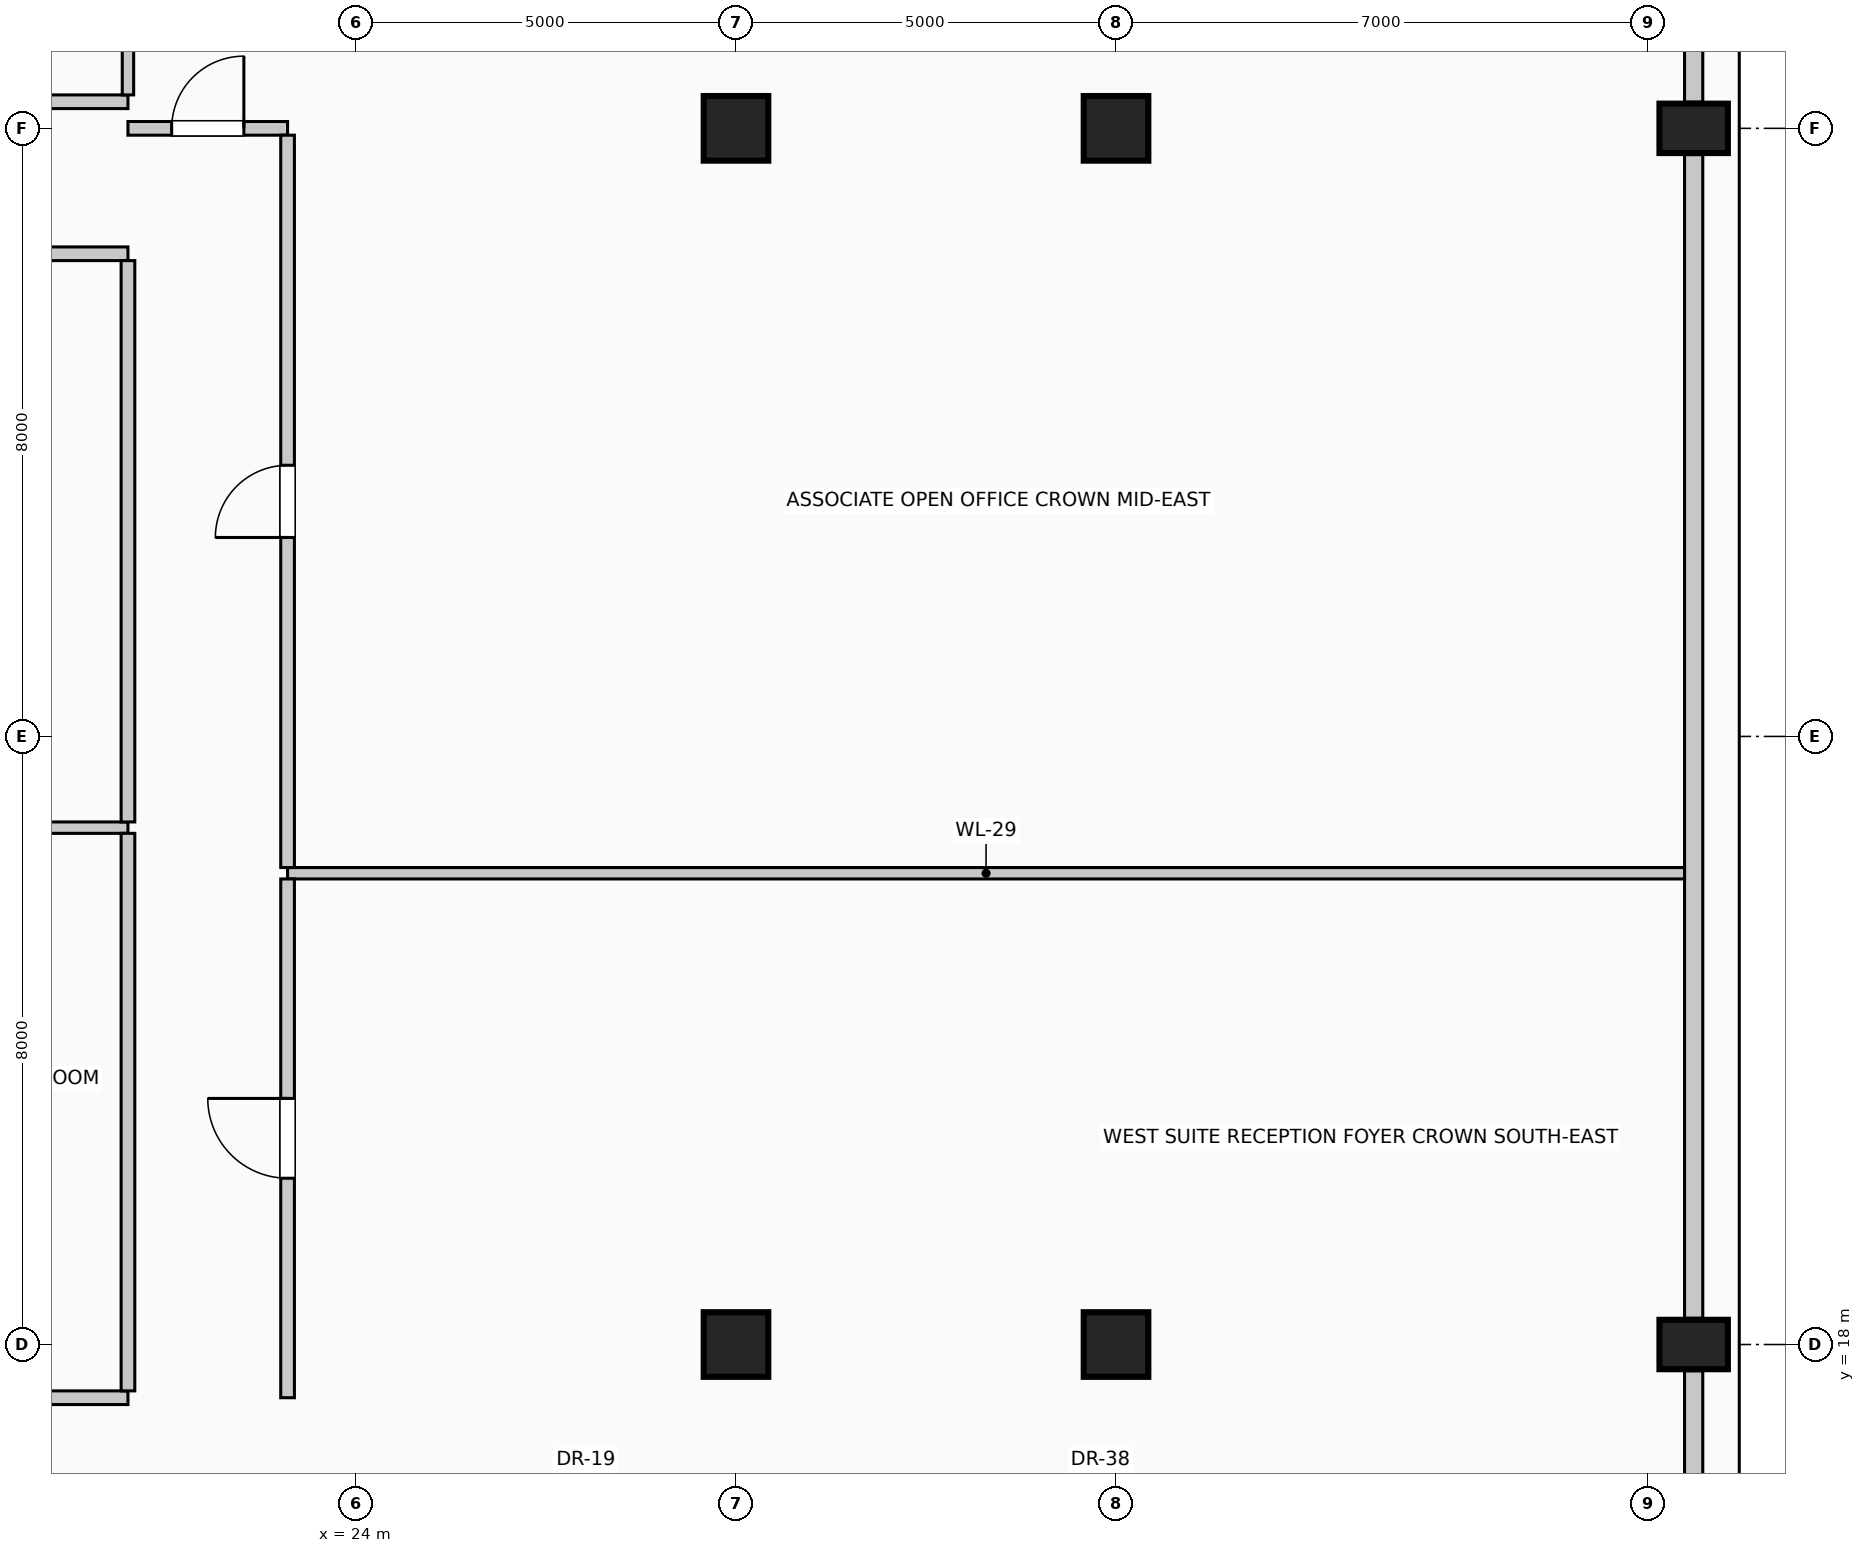
"""IFC4 building model, lengths in metres.
Left out: names, types, materials, properties, quantities, classifications, styles, units other than length and angle.
Written with IfcOpenShell. Run it as: python <this file> out.ifc"""

import sys

from ifc_helpers import new_model, si_unit, direction, frame, frame_2d, origin, origin_2d, place, context, subcontext, project, spatial, rectangle, circle, extrude, element, fill, save


model = new_model("IFC4")
c1 = context("Model", 3, precision=1e-05, world=origin(), true_north=direction((0.0, 1.0)))
c2 = subcontext(c1, "Body", "Model", "MODEL_VIEW")
j1 = project(units=[si_unit("LENGTHUNIT", "METRE"), si_unit("PLANEANGLEUNIT", "RADIAN")], contexts=[c1])
p1 = place(None, origin())
s1 = spatial("IfcSite", under=j1, at=p1, CompositionType="ELEMENT")
p2 = place(p1, origin())
s2 = spatial("IfcBuilding", under=s1, at=p2, CompositionType="ELEMENT")
p3 = place(p2, frame((0.0, 0.0, 301.0)))
s3 = spatial("IfcBuildingStorey", under=s2, at=p3, CompositionType="ELEMENT", Elevation=301.0)
for number, where, z_axis, x_axis in (
    (1, (41.6, 18.0, 0.0), (0.0, 0.0, 1.0), (0.0, 1.0, 0.0)),
    (2, (41.6, 34.0, 0.0), (0.0, 0.0, 1.0), (0.0, 1.0, 0.0)),
):
    element("IfcColumn", number, at=place(p3, frame(where, z_axis=z_axis, x_axis=x_axis)), inside=s3, PredefinedType="COLUMN", context=c2, shape_type="SweptSolid", body=[
        extrude(rectangle(XDim=0.65, YDim=0.9, at=origin_2d()), origin(), (0.0, 0.0, 1.0), 4.0),
    ])
for number, where, z_axis, x_axis in (
    (3, (29.0, 18.0, 0.0), (0.0, 0.0, 1.0), (1.0, 0.0, 0.0)),
    (4, (29.0, 34.0, 0.0), (0.0, 0.0, 1.0), (1.0, 0.0, 0.0)),
    (5, (34.0, 18.0, 0.0), (0.0, 0.0, 1.0), (1.0, 0.0, 0.0)),
    (6, (34.0, 34.0, 0.0), (0.0, 0.0, 1.0), (1.0, 0.0, 0.0)),
):
    element("IfcColumn", number, at=place(p3, frame(where, z_axis=z_axis, x_axis=x_axis)), inside=s3, PredefinedType="COLUMN", context=c2, shape_type="SweptSolid", body=[
        extrude(circle(Radius=0.425, at=origin_2d()), origin(), (0.0, 0.0, 1.0), 4.0),
    ])
p4 = place(p3, frame((41.6, 17.655, 0.0), z_axis=(0.0, 0.0, 1.0), x_axis=(0.0, -1.0, 0.0)))
e7 = element("IfcWall", 7, at=p4, inside=s3, PredefinedType="SOLIDWALL", context=c2, shape_type="SweptSolid", body=[
    extrude(rectangle(XDim=13.71, YDim=0.24, at=frame_2d((6.855, 0.0))), origin(), (0.0, 0.0, 1.0), 3.015),
])
p5 = place(p4, frame((3.17, 0.0, 0.35)))
e8 = element("IfcOpeningElement", 8, at=p5, cuts=e7, PredefinedType="OPENING", context=c2, shape_type="SweptSolid", body=[
    extrude(rectangle(XDim=2.1, YDim=2.2, at=frame_2d((1.05, 1.1))), frame((0.0, 0.13, 0.0), z_axis=(0.0, -1.0, 0.0), x_axis=(1.0, 0.0, 0.0)), (0.0, 0.0, 1.0), 0.26),
])
p6 = place(p4, frame((8.44, 0.0, 0.35)))
e9 = element("IfcOpeningElement", 9, at=p6, cuts=e7, PredefinedType="OPENING", context=c2, shape_type="SweptSolid", body=[
    extrude(rectangle(XDim=2.1, YDim=2.2, at=frame_2d((1.05, 1.1))), frame((0.0, 0.13, 0.0), z_axis=(0.0, -1.0, 0.0), x_axis=(1.0, 0.0, 0.0)), (0.0, 0.0, 1.0), 0.26),
])
p7 = place(p3, frame((41.6, 33.655, 0.0), z_axis=(0.0, 0.0, 1.0), x_axis=(0.0, -1.0, 0.0)))
e10 = element("IfcWall", 10, at=p7, inside=s3, PredefinedType="SOLIDWALL", context=c2, shape_type="SweptSolid", body=[
    extrude(rectangle(XDim=15.31, YDim=0.24, at=frame_2d((7.655, 0.0))), origin(), (0.0, 0.0, 1.0), 3.015),
])
p8 = place(p3, frame((41.6, 42.055, 0.0), z_axis=(0.0, 0.0, 1.0), x_axis=(0.0, -1.0, 0.0)))
e11 = element("IfcWall", 11, at=p8, inside=s3, PredefinedType="SOLIDWALL", context=c2, shape_type="SweptSolid", body=[
    extrude(rectangle(XDim=7.71, YDim=0.24, at=frame_2d((3.855, 0.0))), origin(), (0.0, 0.0, 1.0), 3.015),
])
p9 = place(p3, frame((15.85, 17.3, 0.0), z_axis=(0.0, 0.0, 1.0), x_axis=(1.0, 0.0, 0.0)))
e12 = element("IfcWall", 12, at=p9, inside=s3, PredefinedType="PARTITIONING", context=c2, shape_type="SweptSolid", body=[
    extrude(rectangle(XDim=5.15, YDim=0.18, at=frame_2d((2.575, 0.0))), origin(), (0.0, 0.0, 1.0), 3.775),
])
p10 = place(p9, frame((2.41, 0.0, 0.0)))
e13 = element("IfcOpeningElement", 13, at=p10, cuts=e12, PredefinedType="OPENING", context=c2, shape_type="SweptSolid", body=[
    extrude(rectangle(XDim=1.05, YDim=2.15, at=frame_2d((0.525, 1.075))), frame((0.0, 0.1, 0.0), z_axis=(0.0, -1.0, 0.0), x_axis=(1.0, 0.0, 0.0)), (0.0, 0.0, 1.0), 0.2),
])
p11 = place(p3, frame((23.1, 24.2, 0.0), z_axis=(0.0, 0.0, 1.0), x_axis=(1.0, 0.0, 0.0)))
e14 = element("IfcWall", 14, at=p11, inside=s3, PredefinedType="PARTITIONING", context=c2, shape_type="SweptSolid", body=[
    extrude(rectangle(XDim=18.38, YDim=0.15, at=frame_2d((9.19, 0.0))), origin(), (0.0, 0.0, 1.0), 3.775),
])
p12 = place(p3, frame((15.85, 24.8, 0.0), z_axis=(0.0, 0.0, 1.0), x_axis=(1.0, 0.0, 0.0)))
e15 = element("IfcWall", 15, at=p12, inside=s3, PredefinedType="PARTITIONING", context=c2, shape_type="SweptSolid", body=[
    extrude(rectangle(XDim=5.15, YDim=0.15, at=frame_2d((2.575, 0.0))), origin(), (0.0, 0.0, 1.0), 3.775),
])
p13 = place(p3, frame((15.85, 32.35, 0.0), z_axis=(0.0, 0.0, 1.0), x_axis=(1.0, 0.0, 0.0)))
e16 = element("IfcWall", 16, at=p13, inside=s3, PredefinedType="PARTITIONING", context=c2, shape_type="SweptSolid", body=[
    extrude(rectangle(XDim=5.15, YDim=0.18, at=frame_2d((2.575, 0.0))), origin(), (0.0, 0.0, 1.0), 3.775),
])
p14 = place(p3, frame((21.0, 34.0, 0.0), z_axis=(0.0, 0.0, 1.0), x_axis=(1.0, 0.0, 0.0)))
e17 = element("IfcWall", 17, at=p14, inside=s3, PredefinedType="PARTITIONING", context=c2, shape_type="SweptSolid", body=[
    extrude(rectangle(XDim=2.1, YDim=0.18, at=frame_2d((1.05, 0.0))), origin(), (0.0, 0.0, 1.0), 3.27),
])
p15 = place(p14, frame((0.575, 0.0, 0.0)))
e18 = element("IfcOpeningElement", 18, at=p15, cuts=e17, PredefinedType="OPENING", context=c2, shape_type="SweptSolid", body=[
    extrude(rectangle(XDim=0.95, YDim=2.15, at=frame_2d((0.475, 1.075))), frame((0.0, 0.1, 0.0), z_axis=(0.0, -1.0, 0.0), x_axis=(1.0, 0.0, 0.0)), (0.0, 0.0, 1.0), 0.2),
])
p16 = place(p3, frame((17.0, 34.35, 0.0), z_axis=(0.0, 0.0, 1.0), x_axis=(1.0, 0.0, 0.0)))
e19 = element("IfcWall", 19, at=p16, inside=s3, PredefinedType="PARTITIONING", context=c2, shape_type="SweptSolid", body=[
    extrude(rectangle(XDim=4.0, YDim=0.18, at=frame_2d((2.0, 0.0))), origin(), (0.0, 0.0, 1.0), 3.775),
])
p17 = place(p16, frame((1.56, 0.0, 0.0)))
e20 = element("IfcOpeningElement", 20, at=p17, cuts=e19, PredefinedType="OPENING", context=c2, shape_type="SweptSolid", body=[
    extrude(rectangle(XDim=0.88, YDim=2.1, at=frame_2d((0.44, 1.05))), frame((0.0, 0.1, 0.0), z_axis=(0.0, -1.0, 0.0), x_axis=(1.0, 0.0, 0.0)), (0.0, 0.0, 1.0), 0.2),
])
p18 = place(p3, frame((21.0, 17.39, 0.0), z_axis=(0.0, 0.0, 1.0), x_axis=(0.0, 1.0, 0.0)))
e21 = element("IfcWall", 21, at=p18, inside=s3, PredefinedType="PARTITIONING", context=c2, shape_type="SweptSolid", body=[
    extrude(rectangle(XDim=7.335, YDim=0.18, at=frame_2d((3.667, 0.0))), origin(), (0.0, 0.0, 1.0), 3.775),
])
p19 = place(p3, frame((21.0, 24.875, 0.0), z_axis=(0.0, 0.0, 1.0), x_axis=(0.0, 1.0, 0.0)))
e22 = element("IfcWall", 22, at=p19, inside=s3, PredefinedType="PARTITIONING", context=c2, shape_type="SweptSolid", body=[
    extrude(rectangle(XDim=7.385, YDim=0.18, at=frame_2d((3.692, 0.0))), origin(), (0.0, 0.0, 1.0), 3.775),
])
p20 = place(p3, frame((21.0, 34.44, 0.0), z_axis=(0.0, 0.0, 1.0), x_axis=(0.0, 1.0, 0.0)))
e23 = element("IfcWall", 23, at=p20, inside=s3, PredefinedType="PARTITIONING", context=c2, shape_type="SweptSolid", body=[
    extrude(rectangle(XDim=10.84, YDim=0.15, at=frame_2d((5.42, 0.0))), origin(), (0.0, 0.0, 1.0), 3.775),
])
p21 = place(p3, frame((23.1, 17.3, 0.0), z_axis=(0.0, 0.0, 1.0), x_axis=(0.0, 1.0, 0.0)))
e24 = element("IfcWall", 24, at=p21, inside=s3, PredefinedType="PARTITIONING", context=c2, shape_type="SweptSolid", body=[
    extrude(rectangle(XDim=6.825, YDim=0.18, at=frame_2d((3.413, 0.0))), origin(), (0.0, 0.0, 1.0), 3.775),
])
p22 = place(p21, frame((2.887, 0.0, 0.0)))
e25 = element("IfcOpeningElement", 25, at=p22, cuts=e24, PredefinedType="OPENING", context=c2, shape_type="SweptSolid", body=[
    extrude(rectangle(XDim=1.05, YDim=2.15, at=frame_2d((0.525, 1.075))), frame((0.0, 0.1, 0.0), z_axis=(0.0, -1.0, 0.0), x_axis=(1.0, 0.0, 0.0)), (0.0, 0.0, 1.0), 0.2),
])
p23 = place(p3, frame((23.1, 24.275, 0.0), z_axis=(0.0, 0.0, 1.0), x_axis=(0.0, 1.0, 0.0)))
e26 = element("IfcWall", 26, at=p23, inside=s3, PredefinedType="PARTITIONING", context=c2, shape_type="SweptSolid", body=[
    extrude(rectangle(XDim=9.635, YDim=0.18, at=frame_2d((4.817, 0.0))), origin(), (0.0, 0.0, 1.0), 3.775),
])
p24 = place(p23, frame((4.343, 0.0, 0.0)))
e27 = element("IfcOpeningElement", 27, at=p24, cuts=e26, PredefinedType="OPENING", context=c2, shape_type="SweptSolid", body=[
    extrude(rectangle(XDim=0.95, YDim=2.15, at=frame_2d((0.475, 1.075))), frame((0.0, 0.1, 0.0), z_axis=(0.0, -1.0, 0.0), x_axis=(1.0, 0.0, 0.0)), (0.0, 0.0, 1.0), 0.2),
])
p25 = place(p15, origin())
e28 = element("IfcDoor", 28, at=p25, inside=s3, OperationType="SINGLE_SWING_RIGHT", PredefinedType="DOOR", context=c2, shape_type="SweptSolid", body=[
    extrude(rectangle(XDim=0.95, YDim=2.15, at=frame_2d((0.475, 1.075))), frame((0.0, 0.025, 0.0), z_axis=(0.0, -1.0, 0.0), x_axis=(1.0, 0.0, 0.0)), (0.0, 0.0, 1.0), 0.05),
])
fill(e18, e28)
p26 = place(p22, origin())
e29 = element("IfcDoor", 29, at=p26, inside=s3, OperationType="SINGLE_SWING_RIGHT", PredefinedType="DOOR", context=c2, shape_type="SweptSolid", body=[
    extrude(rectangle(XDim=1.05, YDim=2.15, at=frame_2d((0.525, 1.075))), frame((0.0, 0.025, 0.0), z_axis=(0.0, -1.0, 0.0), x_axis=(1.0, 0.0, 0.0)), (0.0, 0.0, 1.0), 0.05),
])
fill(e25, e29)
p27 = place(p24, origin())
e30 = element("IfcDoor", 30, at=p27, inside=s3, OperationType="SINGLE_SWING_LEFT", PredefinedType="DOOR", context=c2, shape_type="SweptSolid", body=[
    extrude(rectangle(XDim=0.95, YDim=2.15, at=frame_2d((0.475, 1.075))), frame((0.0, 0.025, 0.0), z_axis=(0.0, -1.0, 0.0), x_axis=(1.0, 0.0, 0.0)), (0.0, 0.0, 1.0), 0.05),
])
fill(e27, e30)
save(model, sys.argv[1])
